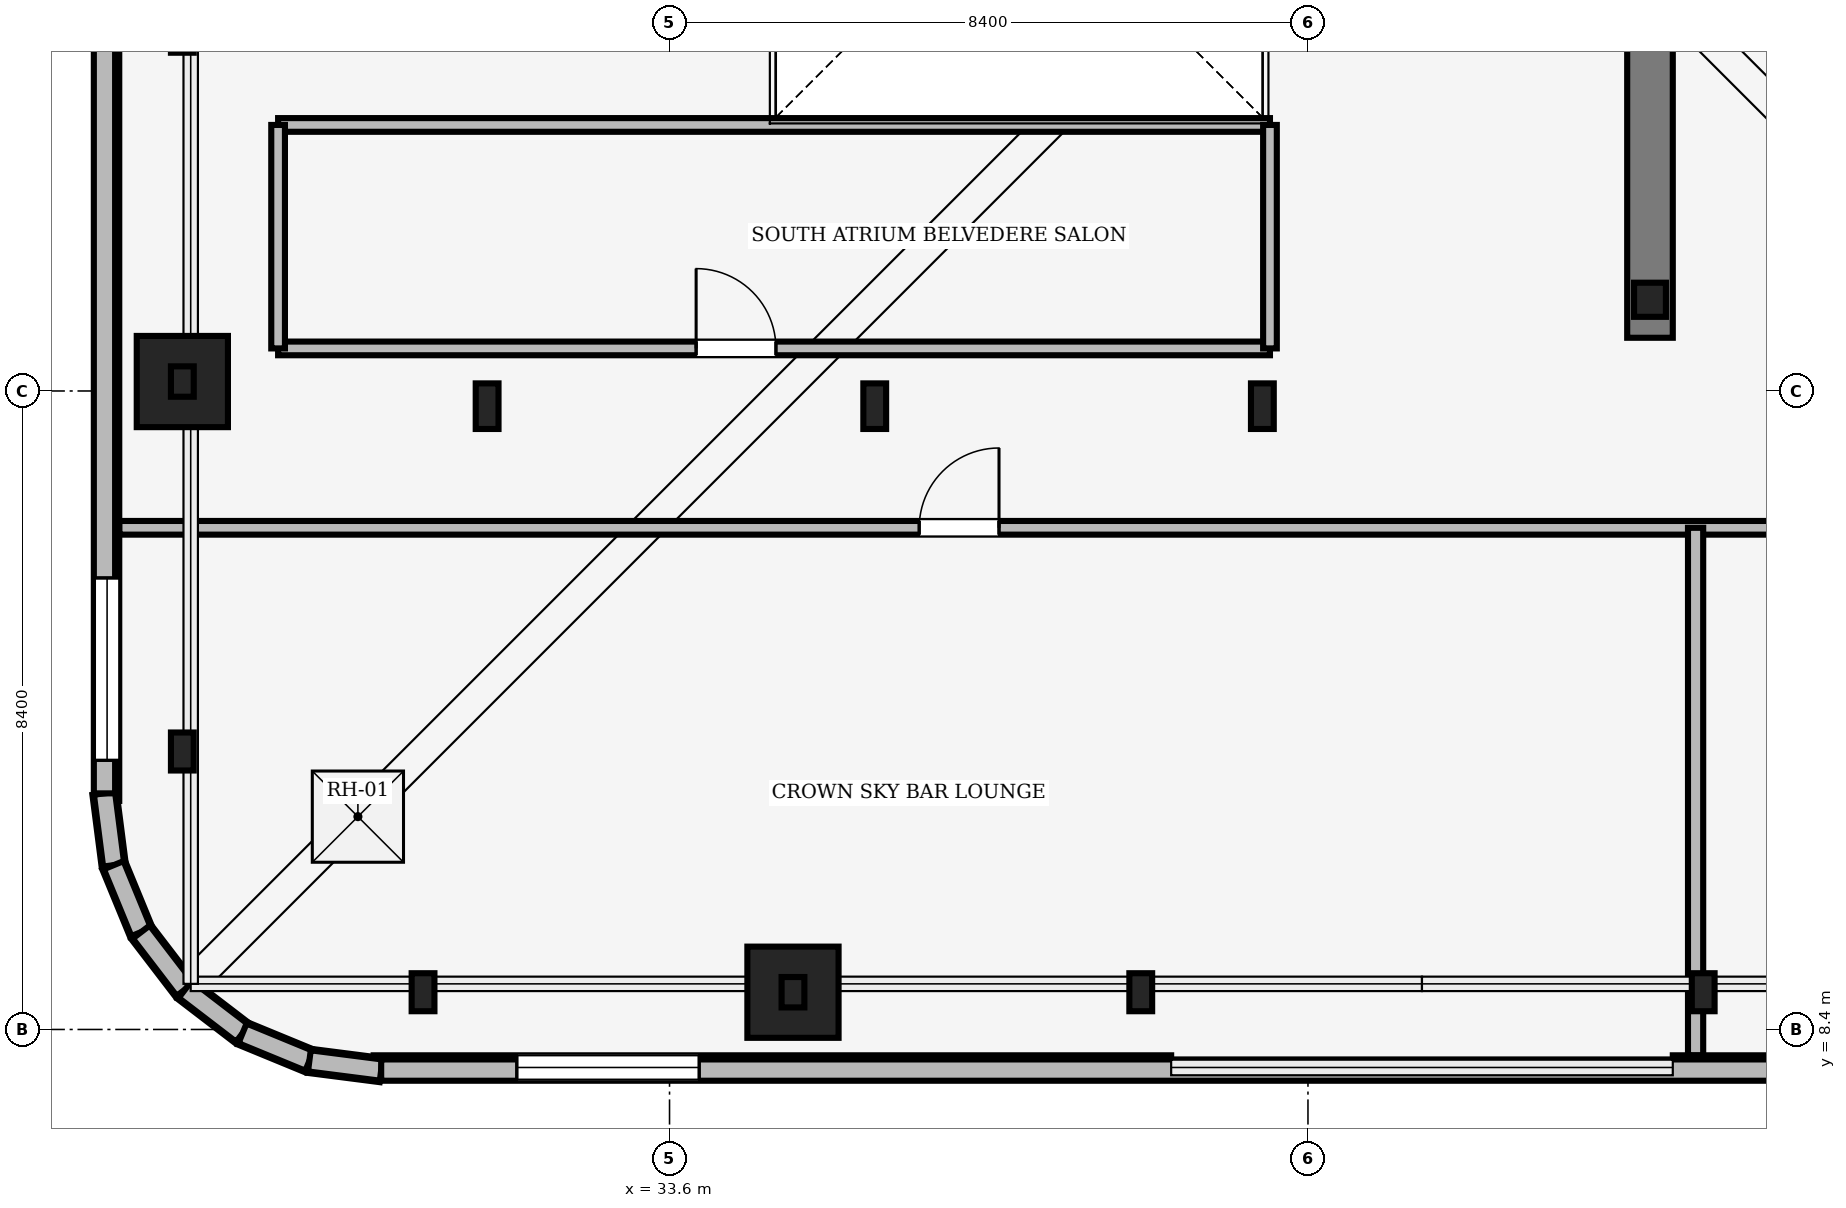
"""IFC4 building model, lengths in metres.
Left out: names, types, materials, properties, quantities, classifications, styles, units other than length and angle.
Written with IfcOpenShell. Run it as: python <this file> out.ifc"""

import sys

from ifc_helpers import new_model, si_unit, direction, frame, frame_2d, origin, origin_2d, place, context, subcontext, project, spatial, rectangle, i_section, extrude, source, transform, mapped, element, fill, save


model = new_model("IFC4")
c1 = context("Model", 3, precision=1e-05, world=origin(), true_north=direction((0.0, 1.0)))
c2 = subcontext(c1, "Body", "Model", "MODEL_VIEW")
j1 = project(units=[si_unit("LENGTHUNIT", "METRE"), si_unit("PLANEANGLEUNIT", "RADIAN")], contexts=[c1])
p1 = place(None, origin())
s1 = spatial("IfcSite", under=j1, at=p1, CompositionType="ELEMENT")
p2 = place(p1, origin())
s2 = spatial("IfcBuilding", under=s1, at=p2, CompositionType="ELEMENT")
p3 = place(p2, frame((0.0, 0.0, 301.15)))
s3 = spatial("IfcBuildingStorey", under=s2, at=p3, CompositionType="ELEMENT", Elevation=301.15)
m1 = source(origin(), c2, "Body", "SweptSolid", [
    extrude(rectangle(XDim=13.15, YDim=0.6, at=frame_2d((6.575, 0.0))), origin(), (0.0, 0.0, 1.0), 4.7),
])
p4 = place(p3, frame((46.5, 17.5, 0.0), z_axis=(0.0, 0.0, 1.0), x_axis=(0.0, 1.0, 0.0)))
e1 = element("IfcWall", 1, at=p4, inside=s3, PredefinedType="SHEAR", context=c2, shape_type="MappedRepresentation", body=[
    mapped(m1, transform((0.0, 0.0, 0.0), scale=1.0)),
])
m2 = source(origin(), c2, "Body", "SweptSolid", [
    extrude(i_section(OverallWidth=0.3, OverallDepth=0.6, WebThickness=0.015, FlangeThickness=0.03, FilletRadius=0.027, at=origin_2d()), origin(), (0.0, 0.0, 1.0), 4.6),
])
for number, where, z_axis, x_axis in (
    (2, (31.2, 16.6, 0.0), (0.0, 0.0, 1.0), (1.0, 0.0, 0.0)),
    (3, (36.3, 16.6, 0.0), (0.0, 0.0, 1.0), (1.0, 0.0, 0.0)),
    (4, (41.4, 16.6, 0.0), (0.0, 0.0, 1.0), (1.0, 0.0, 0.0)),
):
    element("IfcColumn", number, at=place(p3, frame(where, z_axis=z_axis, x_axis=x_axis)), inside=s3, PredefinedType="COLUMN", context=c2, shape_type="MappedRepresentation", body=[
        mapped(m2, transform((0.0, 0.0, 0.0), scale=1.0)),
    ])
m3 = source(origin(), c2, "Body", "SweptSolid", [
    extrude(rectangle(XDim=1.2, YDim=1.2, at=origin_2d()), origin(), (0.0, 0.0, 1.0), 4.6),
])
for number, where, z_axis, x_axis in (
    (5, (35.224, 8.89, 0.0), (0.0, 0.0, 1.0), (1.0, 0.0, 0.0)),
    (6, (27.19, 16.924, 0.0), (0.0, 0.0, 1.0), (1.0, 0.0, 0.0)),
):
    element("IfcColumn", number, at=place(p3, frame(where, z_axis=z_axis, x_axis=x_axis)), inside=s3, PredefinedType="COLUMN", context=c2, shape_type="MappedRepresentation", body=[
        mapped(m3, transform((0.0, 0.0, 0.0), scale=1.0)),
    ])
m4 = source(origin(), c2, "Body", "SweptSolid", [
    extrude(i_section(OverallWidth=0.3, OverallDepth=0.5, WebThickness=0.014, FlangeThickness=0.028, FilletRadius=0.027, at=origin_2d()), origin(), (0.0, 0.0, 1.0), 4.6),
])
for number, where, z_axis, x_axis in (
    (7, (30.357, 8.89, 0.0), (0.0, 0.0, 1.0), (1.0, 0.0, 0.0)),
    (8, (39.8, 8.89, 0.0), (0.0, 0.0, 1.0), (1.0, 0.0, 0.0)),
    (9, (47.2, 8.89, 0.0), (0.0, 0.0, 1.0), (1.0, 0.0, 0.0)),
    (10, (27.19, 12.057, 0.0), (0.0, 0.0, 1.0), (1.0, 0.0, 0.0)),
):
    element("IfcColumn", number, at=place(p3, frame(where, z_axis=z_axis, x_axis=x_axis)), inside=s3, PredefinedType="COLUMN", context=c2, shape_type="MappedRepresentation", body=[
        mapped(m4, transform((0.0, 0.0, 0.0), scale=1.0)),
    ])
m5 = source(origin(), c2, "Body", "SweptSolid", [
    extrude(i_section(OverallWidth=0.3, OverallDepth=0.4, WebThickness=0.013, FlangeThickness=0.024, FilletRadius=0.027, at=origin_2d()), origin(), (0.0, 0.0, 1.0), 12.85),
])
for number, where, z_axis, x_axis in (
    (11, (35.224, 8.89, 5.0), (0.0, 0.0, 1.0), (1.0, 0.0, 0.0)),
    (12, (27.19, 16.924, 5.0), (0.0, 0.0, 1.0), (1.0, 0.0, 0.0)),
):
    element("IfcColumn", number, at=place(p3, frame(where, z_axis=z_axis, x_axis=x_axis)), inside=s3, PredefinedType="COLUMN", context=c2, shape_type="MappedRepresentation", body=[
        mapped(m5, transform((0.0, 0.0, 0.0), scale=1.0)),
    ])
m6 = source(origin(), c2, "Body", "SweptSolid", [
    extrude(i_section(OverallWidth=0.419, OverallDepth=0.449, WebThickness=0.031, FlangeThickness=0.048, FilletRadius=0.015, at=origin_2d()), origin(), (0.0, 0.0, 1.0), 4.6),
])
p5 = place(p3, frame((46.5, 18.0, 0.0), z_axis=(0.0, 0.0, 1.0), x_axis=(1.0, 0.0, 0.0)))
e13 = element("IfcColumn", 13, at=p5, inside=s3, PredefinedType="COLUMN", context=c2, shape_type="MappedRepresentation", body=[
    mapped(m6, transform((0.0, 0.0, 0.0), scale=1.0)),
])
m7 = source(origin(), c2, "Body", "SweptSolid", [
    extrude(rectangle(XDim=10.493, YDim=0.32, at=frame_2d((5.247, 0.0))), origin(), (0.0, 0.0, 1.0), 4.6),
])
p6 = place(p3, frame((29.707, 7.9, 0.0), z_axis=(0.0, 0.0, 1.0), x_axis=(1.0, 0.0, 0.0)))
e14 = element("IfcWall", 14, at=p6, inside=s3, PredefinedType="SOLIDWALL", context=c2, shape_type="MappedRepresentation", body=[
    mapped(m7, transform((0.0, 0.0, 0.0), scale=1.0)),
])
m8 = source(origin(), c2, "Body", "SweptSolid", [
    extrude(rectangle(XDim=2.4, YDim=3.2, at=frame_2d((1.2, 1.6))), frame((0.0, 0.17, 0.0), z_axis=(0.0, -1.0, 0.0), x_axis=(1.0, 0.0, 0.0)), (0.0, 0.0, 1.0), 0.34),
])
p7 = place(p6, frame((1.884, 0.0, 0.72)))
e15 = element("IfcOpeningElement", 15, at=p7, cuts=e14, PredefinedType="OPENING", context=c2, shape_type="MappedRepresentation", body=[
    mapped(m8, transform((0.0, 0.0, 0.0), scale=1.0)),
])
p8 = place(p3, frame((46.8, 7.9, 0.0), z_axis=(0.0, 0.0, 1.0), x_axis=(1.0, 0.0, 0.0)))
e16 = element("IfcWall", 16, at=p8, inside=s3, PredefinedType="SOLIDWALL", context=c2, shape_type="MappedRepresentation", body=[
    mapped(m7, transform((0.0, 0.0, 0.0), scale=1.0)),
])
p9 = place(p8, frame((6.209, 0.0, 0.72)))
e17 = element("IfcOpeningElement", 17, at=p9, cuts=e16, PredefinedType="OPENING", context=c2, shape_type="MappedRepresentation", body=[
    mapped(m8, transform((0.0, 0.0, 0.0), scale=1.0)),
])
p10 = place(p3, frame((26.2, 21.9, 0.0), z_axis=(0.0, 0.0, 1.0), x_axis=(0.0, -1.0, 0.0)))
e18 = element("IfcWall", 18, at=p10, inside=s3, PredefinedType="SOLIDWALL", context=c2, shape_type="MappedRepresentation", body=[
    mapped(m7, transform((0.0, 0.0, 0.0), scale=1.0)),
])
p11 = place(p10, frame((7.559, 0.0, 0.72)))
e19 = element("IfcOpeningElement", 19, at=p11, cuts=e18, PredefinedType="OPENING", context=c2, shape_type="MappedRepresentation", body=[
    mapped(m8, transform((0.0, 0.0, 0.0), scale=1.0)),
])
m9 = source(origin(), c2, "Body", "SweptSolid", [
    extrude(rectangle(XDim=0.952, YDim=0.32, at=frame_2d((0.476, 0.0))), origin(), (0.0, 0.0, 1.0), 4.6),
])
p12 = place(p3, frame((26.166, 11.506, 0.0), z_axis=(0.0, 0.0, 1.0), x_axis=(0.127410057845, -0.991850128376, 0.0)))
e20 = element("IfcWall", 20, at=p12, inside=s3, PredefinedType="SOLIDWALL", context=c2, shape_type="MappedRepresentation", body=[
    mapped(m9, transform((0.0, 0.0, 0.0), scale=1.0)),
])
m10 = source(origin(), c2, "Body", "SweptSolid", [
    extrude(rectangle(XDim=0.951, YDim=0.32, at=frame_2d((0.476, 0.0))), origin(), (0.0, 0.0, 1.0), 4.6),
])
p13 = place(p3, frame((26.287, 10.562, 0.0), z_axis=(0.0, 0.0, 1.0), x_axis=(0.380620714252, -0.924731243055, 0.0)))
e21 = element("IfcWall", 21, at=p13, inside=s3, PredefinedType="SOLIDWALL", context=c2, shape_type="MappedRepresentation", body=[
    mapped(m10, transform((0.0, 0.0, 0.0), scale=1.0)),
])
m11 = source(origin(), c2, "Body", "SweptSolid", [
    extrude(rectangle(XDim=0.951, YDim=0.32, at=frame_2d((0.475, 0.0))), origin(), (0.0, 0.0, 1.0), 4.6),
])
for number, where, z_axis, x_axis in (
    (22, (26.649, 9.682, 0.0), (0.0, 0.0, 1.0), (0.608, -0.794, 0.0)),
    (23, (27.227, 8.927, 0.0), (0.0, 0.0, 1.0), (0.794, -0.608, 0.0)),
):
    element("IfcWall", number, at=place(p3, frame(where, z_axis=z_axis, x_axis=x_axis)), inside=s3, PredefinedType="SOLIDWALL", context=c2, shape_type="MappedRepresentation", body=[
        mapped(m11, transform((0.0, 0.0, 0.0), scale=1.0)),
    ])
p14 = place(p3, frame((27.982, 8.349, 0.0), z_axis=(0.0, 0.0, 1.0), x_axis=(0.924731243055, -0.380620714252, 0.0)))
e24 = element("IfcWall", 24, at=p14, inside=s3, PredefinedType="SOLIDWALL", context=c2, shape_type="MappedRepresentation", body=[
    mapped(m10, transform((0.0, 0.0, 0.0), scale=1.0)),
])
p15 = place(p3, frame((28.862, 7.987, 0.0), z_axis=(0.0, 0.0, 1.0), x_axis=(0.991850128376, -0.127410057845, 0.0)))
e25 = element("IfcWall", 25, at=p15, inside=s3, PredefinedType="SOLIDWALL", context=c2, shape_type="MappedRepresentation", body=[
    mapped(m9, transform((0.0, 0.0, 0.0), scale=1.0)),
])
m12 = source(origin(), c2, "Body", "SweptSolid", [
    extrude(rectangle(XDim=0.952, YDim=0.28, at=frame_2d((0.476, 0.0))), origin(), (0.0, 0.0, 1.0), 1.15),
])
p16 = place(p3, frame((26.166, 11.506, 5.0), z_axis=(0.0, 0.0, 1.0), x_axis=(0.127410057845, -0.991850128376, 0.0)))
e26 = element("IfcWall", 26, at=p16, inside=s3, PredefinedType="SOLIDWALL", context=c2, shape_type="MappedRepresentation", body=[
    mapped(m12, transform((0.0, 0.0, 0.0), scale=1.0)),
])
m13 = source(origin(), c2, "Body", "SweptSolid", [
    extrude(rectangle(XDim=0.951, YDim=0.28, at=frame_2d((0.476, 0.0))), origin(), (0.0, 0.0, 1.0), 1.15),
])
p17 = place(p3, frame((26.287, 10.562, 5.0), z_axis=(0.0, 0.0, 1.0), x_axis=(0.380620714252, -0.924731243055, 0.0)))
e27 = element("IfcWall", 27, at=p17, inside=s3, PredefinedType="SOLIDWALL", context=c2, shape_type="MappedRepresentation", body=[
    mapped(m13, transform((0.0, 0.0, 0.0), scale=1.0)),
])
m14 = source(origin(), c2, "Body", "SweptSolid", [
    extrude(rectangle(XDim=0.951, YDim=0.28, at=frame_2d((0.475, 0.0))), origin(), (0.0, 0.0, 1.0), 1.15),
])
for number, where, z_axis, x_axis in (
    (28, (26.649, 9.682, 5.0), (0.0, 0.0, 1.0), (0.608, -0.794, 0.0)),
    (29, (27.227, 8.927, 5.0), (0.0, 0.0, 1.0), (0.794, -0.608, 0.0)),
):
    element("IfcWall", number, at=place(p3, frame(where, z_axis=z_axis, x_axis=x_axis)), inside=s3, PredefinedType="SOLIDWALL", context=c2, shape_type="MappedRepresentation", body=[
        mapped(m14, transform((0.0, 0.0, 0.0), scale=1.0)),
    ])
p18 = place(p3, frame((27.982, 8.349, 5.0), z_axis=(0.0, 0.0, 1.0), x_axis=(0.924731243055, -0.380620714252, 0.0)))
e30 = element("IfcWall", 30, at=p18, inside=s3, PredefinedType="SOLIDWALL", context=c2, shape_type="MappedRepresentation", body=[
    mapped(m13, transform((0.0, 0.0, 0.0), scale=1.0)),
])
p19 = place(p3, frame((28.862, 7.987, 5.0), z_axis=(0.0, 0.0, 1.0), x_axis=(0.991850128376, -0.127410057845, 0.0)))
e31 = element("IfcWall", 31, at=p19, inside=s3, PredefinedType="SOLIDWALL", context=c2, shape_type="MappedRepresentation", body=[
    mapped(m12, transform((0.0, 0.0, 0.0), scale=1.0)),
])
m15 = source(origin(), c2, "Body", "SweptSolid", [
    extrude(rectangle(XDim=27.388, YDim=0.28, at=frame_2d((13.694, 0.0))), origin(), (0.0, 0.0, 1.0), 1.15),
])
for number, where, z_axis, x_axis in (
    (32, (29.806, 7.865, 5.0), (0.0, 0.0, 1.0), (1.0, 0.0, 0.0)),
    (33, (26.166, 38.894, 5.0), (0.0, 0.0, 1.0), (0.0, -1.0, 0.0)),
):
    element("IfcWall", number, at=place(p3, frame(where, z_axis=z_axis, x_axis=x_axis)), inside=s3, PredefinedType="SOLIDWALL", context=c2, shape_type="MappedRepresentation", body=[
        mapped(m15, transform((0.0, 0.0, 0.0), scale=1.0)),
    ])
m16 = source(origin(), c2, "Body", "SweptSolid", [
    extrude(rectangle(XDim=23.938, YDim=0.18, at=frame_2d((11.969, 0.0))), origin(), (0.0, 0.0, 1.0), 4.142),
])
p20 = place(p3, frame((26.362, 15.0, 0.0), z_axis=(0.0, 0.0, 1.0), x_axis=(1.0, 0.0, 0.0)))
e34 = element("IfcWall", 34, at=p20, inside=s3, PredefinedType="PARTITIONING", context=c2, shape_type="MappedRepresentation", body=[
    mapped(m16, transform((0.0, 0.0, 0.0), scale=1.0)),
])
m17 = source(origin(), c2, "Body", "SweptSolid", [
    extrude(rectangle(XDim=1.05, YDim=2.2, at=frame_2d((0.525, 1.1))), frame((0.0, 0.1, 0.0), z_axis=(0.0, -1.0, 0.0), x_axis=(1.0, 0.0, 0.0)), (0.0, 0.0, 1.0), 0.2),
])
p21 = place(p20, frame((10.523, 0.0, 0.0)))
e35 = element("IfcOpeningElement", 35, at=p21, cuts=e34, PredefinedType="OPENING", context=c2, shape_type="MappedRepresentation", body=[
    mapped(m17, transform((0.0, 0.0, 0.0), scale=1.0)),
])
p22 = place(p20, frame((22.688, 0.0, 0.0)))
e36 = element("IfcOpeningElement", 36, at=p22, cuts=e34, PredefinedType="OPENING", context=c2, shape_type="MappedRepresentation", body=[
    mapped(m17, transform((0.0, 0.0, 0.0), scale=1.0)),
])
m18 = source(origin(), c2, "Body", "SweptSolid", [
    extrude(rectangle(XDim=13.05, YDim=0.18, at=frame_2d((6.525, 0.0))), origin(), (0.0, 0.0, 1.0), 2.792),
])
p23 = place(p3, frame((28.45, 17.36, 0.0), z_axis=(0.0, 0.0, 1.0), x_axis=(1.0, 0.0, 0.0)))
e37 = element("IfcWall", 37, at=p23, inside=s3, PredefinedType="PARTITIONING", context=c2, shape_type="MappedRepresentation", body=[
    mapped(m18, transform((0.0, 0.0, 0.0), scale=1.0)),
])
p24 = place(p23, frame((5.5, 0.0, 0.0)))
e38 = element("IfcOpeningElement", 38, at=p24, cuts=e37, PredefinedType="OPENING", context=c2, shape_type="MappedRepresentation", body=[
    mapped(m17, transform((0.0, 0.0, 0.0), scale=1.0)),
])
p25 = place(p3, frame((28.45, 20.3, 0.0), z_axis=(0.0, 0.0, 1.0), x_axis=(1.0, 0.0, 0.0)))
e39 = element("IfcWall", 39, at=p25, inside=s3, PredefinedType="PARTITIONING", context=c2, shape_type="MappedRepresentation", body=[
    mapped(m18, transform((0.0, 0.0, 0.0), scale=1.0)),
])
m19 = source(origin(), c2, "Body", "SweptSolid", [
    extrude(rectangle(XDim=6.938, YDim=0.2, at=frame_2d((3.469, 0.0))), origin(), (0.0, 0.0, 1.0), 4.142),
])
p26 = place(p3, frame((47.1, 8.062, 0.0), z_axis=(0.0, 0.0, 1.0), x_axis=(0.0, 1.0, 0.0)))
e40 = element("IfcWall", 40, at=p26, inside=s3, PredefinedType="PARTITIONING", context=c2, shape_type="MappedRepresentation", body=[
    mapped(m19, transform((0.0, 0.0, 0.0), scale=1.0)),
])
m20 = source(origin(), c2, "Body", "SweptSolid", [
    extrude(rectangle(XDim=2.94, YDim=0.18, at=frame_2d((1.47, 0.0))), origin(), (0.0, 0.0, 1.0), 4.6),
])
p27 = place(p3, frame((28.45, 17.36, 0.0), z_axis=(0.0, 0.0, 1.0), x_axis=(0.0, 1.0, 0.0)))
e41 = element("IfcWall", 41, at=p27, inside=s3, PredefinedType="PARTITIONING", context=c2, shape_type="MappedRepresentation", body=[
    mapped(m20, transform((0.0, 0.0, 0.0), scale=1.0)),
])
m21 = source(origin(), c2, "Body", "SweptSolid", [
    extrude(rectangle(XDim=2.94, YDim=0.18, at=frame_2d((1.47, 0.0))), origin(), (0.0, 0.0, 1.0), 2.792),
])
p28 = place(p3, frame((41.5, 17.36, 0.0), z_axis=(0.0, 0.0, 1.0), x_axis=(0.0, 1.0, 0.0)))
e42 = element("IfcWall", 42, at=p28, inside=s3, PredefinedType="PARTITIONING", context=c2, shape_type="MappedRepresentation", body=[
    mapped(m21, transform((0.0, 0.0, 0.0), scale=1.0)),
])
m22 = source(origin(), c2, "Body", "SweptSolid", [
    extrude(rectangle(XDim=2.4, YDim=3.2, at=frame_2d((1.2, 1.6))), frame((0.0, 0.03, 0.0), z_axis=(0.0, -1.0, 0.0), x_axis=(1.0, 0.0, 0.0)), (0.0, 0.0, 1.0), 0.06),
])
p29 = place(p7, origin())
e43 = element("IfcWindow", 43, at=p29, inside=s3, PartitioningType="SINGLE_PANEL", PredefinedType="WINDOW", context=c2, shape_type="MappedRepresentation", body=[
    mapped(m22, transform((0.0, 0.0, 0.0), scale=1.0)),
])
fill(e15, e43)
p30 = place(p11, origin())
e44 = element("IfcWindow", 44, at=p30, inside=s3, PartitioningType="SINGLE_PANEL", PredefinedType="WINDOW", context=c2, shape_type="MappedRepresentation", body=[
    mapped(m22, transform((0.0, 0.0, 0.0), scale=1.0)),
])
fill(e19, e44)
p31 = place(p3, frame((0.0, 0.0, 4.6)))
p32 = place(p31, frame((29.5, 11.2, 0.35)))
e45 = element("IfcWindow", 45, at=p32, inside=s3, PartitioningType="SINGLE_PANEL", PredefinedType="SKYLIGHT", context=c2, shape_type="SweptSolid", body=[
    extrude(rectangle(XDim=1.2, YDim=1.2, at=origin_2d()), origin(), (0.0, 0.0, 1.0), 0.05),
])
m23 = source(origin(), c2, "Body", "SweptSolid", [
    extrude(rectangle(XDim=1.05, YDim=2.2, at=frame_2d((0.525, 1.1))), frame((0.0, 0.025, 0.0), z_axis=(0.0, -1.0, 0.0), x_axis=(1.0, 0.0, 0.0)), (0.0, 0.0, 1.0), 0.05),
])
p33 = place(p21, origin())
e46 = element("IfcDoor", 46, at=p33, inside=s3, OperationType="SINGLE_SWING_RIGHT", PredefinedType="DOOR", context=c2, shape_type="MappedRepresentation", body=[
    mapped(m23, transform((0.0, 0.0, 0.0), scale=1.0)),
])
fill(e35, e46)
p34 = place(p24, origin())
e47 = element("IfcDoor", 47, at=p34, inside=s3, OperationType="SINGLE_SWING_LEFT", PredefinedType="DOOR", context=c2, shape_type="MappedRepresentation", body=[
    mapped(m23, transform((0.0, 0.0, 0.0), scale=1.0)),
])
fill(e38, e47)
save(model, sys.argv[1])
